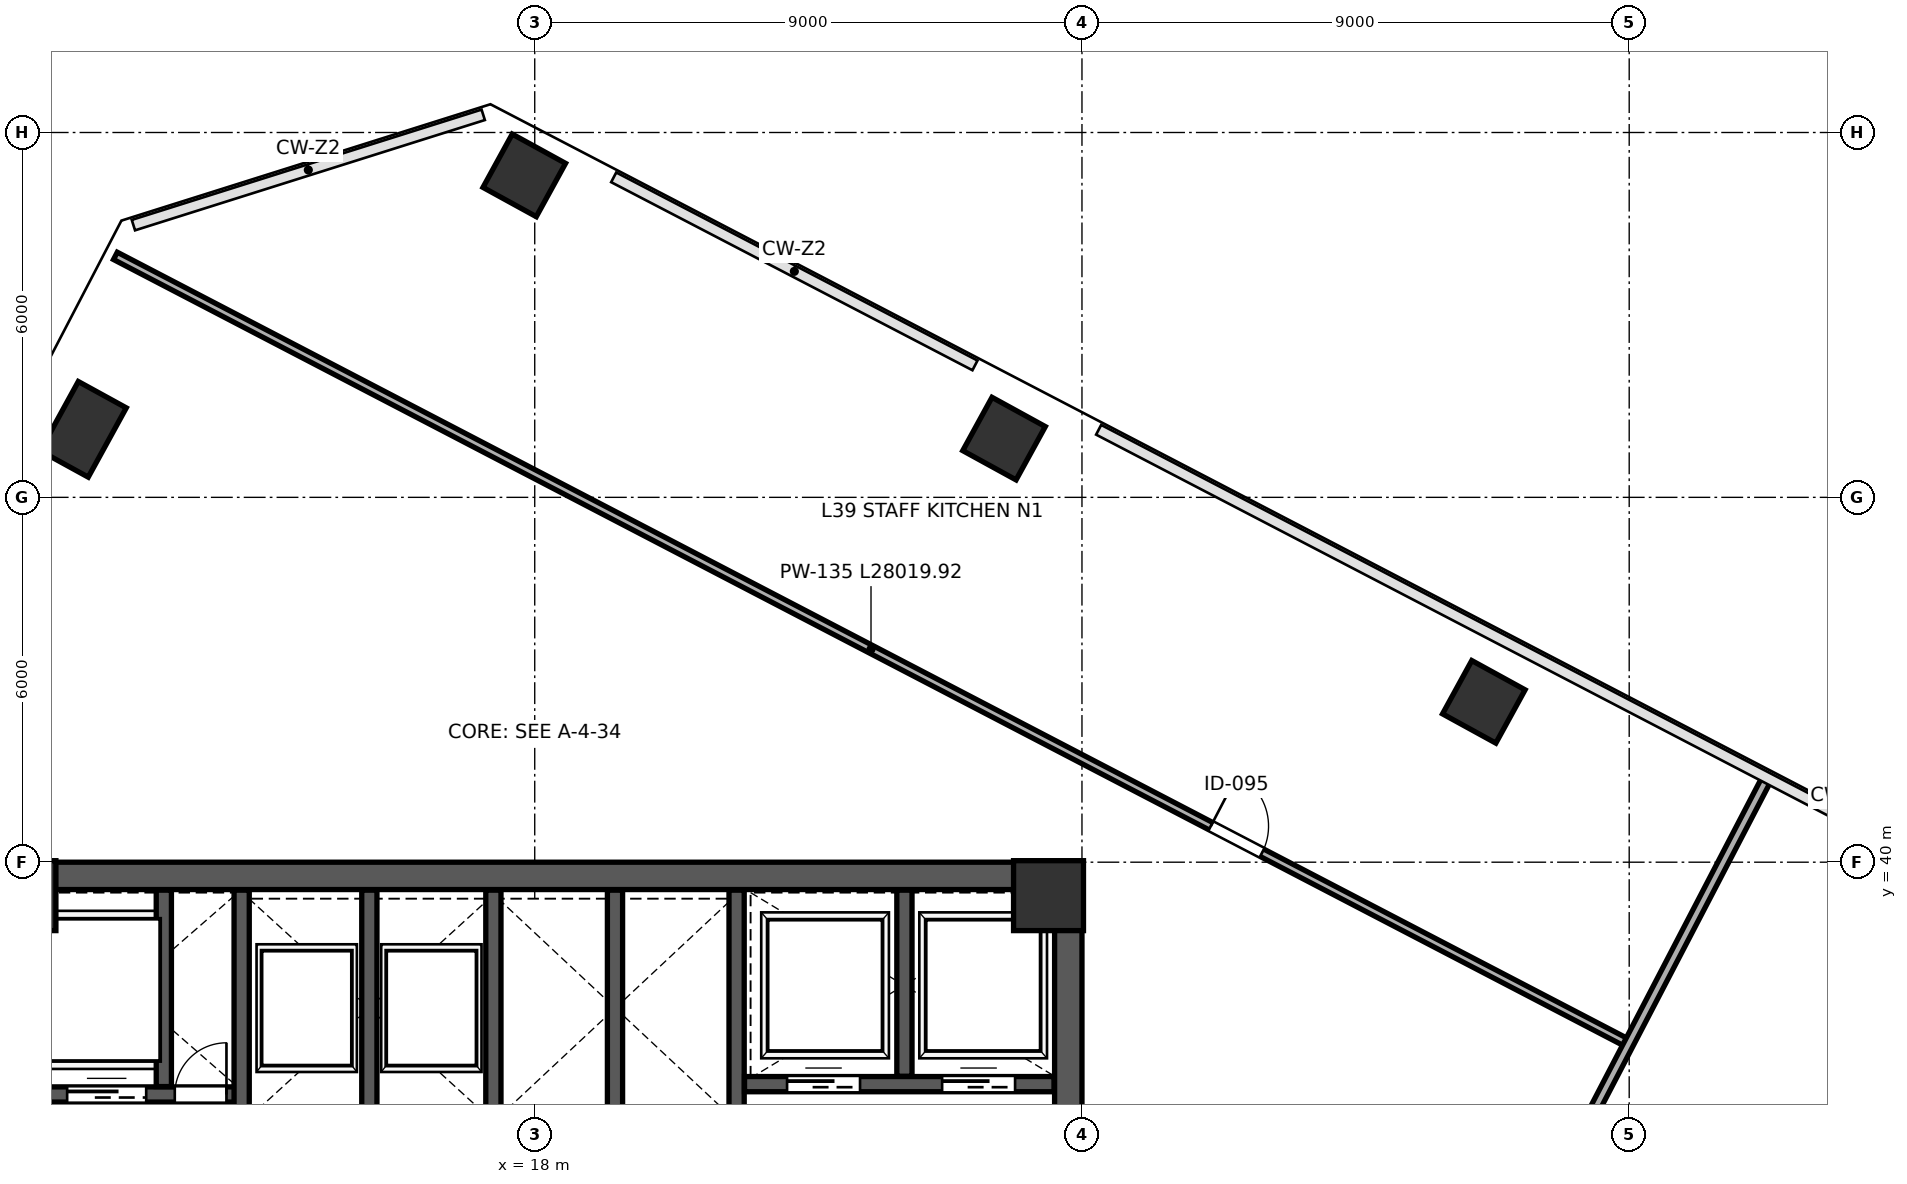
"""IFC4 building model, lengths in metres.
Left out: names, types, materials, properties, quantities, classifications, styles, units other than length and angle.
Written with IfcOpenShell. Run it as: python <this file> out.ifc"""

import sys

from ifc_helpers import new_model, si_unit, direction, frame, frame_2d, origin, origin_2d, place, context, subcontext, project, spatial, rectangle, extrude, clip, halfspace, source, transform, mapped, element, fill, save


model = new_model("IFC4")
c1 = context("Model", 3, precision=1e-05, world=origin(), true_north=direction((0.0, 1.0)))
c2 = subcontext(c1, "Body", "Model", "MODEL_VIEW")
j1 = project(units=[si_unit("LENGTHUNIT", "METRE"), si_unit("PLANEANGLEUNIT", "RADIAN")], contexts=[c1])
p1 = place(None, origin())
s1 = spatial("IfcSite", under=j1, at=p1, CompositionType="ELEMENT")
p2 = place(p1, origin())
s2 = spatial("IfcBuilding", under=s1, at=p2, CompositionType="ELEMENT")
p3 = place(p2, frame((0.0, 0.0, 175.0)))
s3 = spatial("IfcBuildingStorey", under=s2, at=p3, CompositionType="ELEMENT", Elevation=175.0)
m1 = source(origin(), c2, "Body", "SweptSolid", [
    extrude(rectangle(XDim=1.15, YDim=1.15, at=origin_2d()), origin(), (0.0, 0.0, 1.0), 4.198),
])
for number, where, z_axis, x_axis in (
    (1, (9.55, 39.45, 0.001), (0.0, 0.0, 1.0), (1.0, 0.0, 0.0)),
    (2, (26.45, 39.45, 0.001), (0.0, 0.0, 1.0), (1.0, 0.0, 0.0)),
):
    element("IfcColumn", number, at=place(p3, frame(where, z_axis=z_axis, x_axis=x_axis)), inside=s3, PredefinedType="COLUMN", context=c2, shape_type="MappedRepresentation", body=[
        mapped(m1, transform((0.0, 0.0, 0.0), scale=1.0)),
    ])
p4 = place(p3, frame((17.828, 51.295, 0.0), z_axis=(0.099928697184, 0.017869194114, 0.994834130587), x_axis=(-0.316704561364, -0.94726667041, 0.048827000127)))
e3 = element("IfcColumn", 3, at=p4, inside=s3, PredefinedType="COLUMN", context=c2, shape_type="Clipping", body=[
    clip(clip(extrude(rectangle(XDim=1.0, YDim=1.0, at=origin_2d()), origin(), (0.0, 0.0, 1.0), 4.222), halfspace(frame((0.0, 0.0, 0.07), z_axis=(0.0, 0.0, -1.0), x_axis=(1.0, 0.0, 0.0)), False)), halfspace(frame((0.0, 0.0, 4.152), z_axis=(0.0, 0.0, 1.0), x_axis=(1.0, 0.0, 0.0)), False)),
])
p5 = place(p3, frame((25.719, 46.966, 0.0), z_axis=(0.077235078987, -0.022654850625, 0.996755486725), x_axis=(-0.706813326993, -0.706339945504, 0.038714366459)))
e4 = element("IfcColumn", 4, at=p5, inside=s3, PredefinedType="COLUMN", context=c2, shape_type="Clipping", body=[
    clip(clip(extrude(rectangle(XDim=1.0, YDim=1.0, at=origin_2d()), origin(), (0.0, 0.0, 1.0), 4.214), halfspace(frame((0.0, 0.0, 0.056), z_axis=(0.0, 0.0, -1.0), x_axis=(1.0, 0.0, 0.0)), False)), halfspace(frame((0.0, 0.0, 4.158), z_axis=(0.0, 0.0, 1.0), x_axis=(1.0, 0.0, 0.0)), False)),
])
p6 = place(p3, frame((33.609, 42.637, 0.0), z_axis=(0.054393222094, -0.063256015471, 0.996513950679), x_axis=(-0.977264659428, -0.208191259518, 0.040127109214)))
e5 = element("IfcColumn", 5, at=p6, inside=s3, PredefinedType="COLUMN", context=c2, shape_type="Clipping", body=[
    clip(clip(extrude(rectangle(XDim=1.0, YDim=1.0, at=origin_2d()), origin(), (0.0, 0.0, 1.0), 4.215), halfspace(frame((0.0, 0.0, 0.058), z_axis=(0.0, 0.0, -1.0), x_axis=(1.0, 0.0, 0.0)), False)), halfspace(frame((0.0, 0.0, 4.157), z_axis=(0.0, 0.0, 1.0), x_axis=(1.0, 0.0, 0.0)), False)),
])
p7 = place(p3, frame((10.575, 47.118, 0.0), z_axis=(0.078745413321, 0.055659873339, 0.995339710039), x_axis=(0.115101966817, -0.992270247351, 0.046382038081)))
e6 = element("IfcColumn", 6, at=p7, inside=s3, PredefinedType="PILASTER", context=c2, shape_type="Clipping", body=[
    clip(clip(extrude(rectangle(XDim=0.9, YDim=1.3, at=origin_2d()), origin(), (0.0, 0.0, 1.0), 4.22), halfspace(frame((0.0, 0.0, 0.077), z_axis=(0.0, 0.0, -1.0), x_axis=(1.0, 0.0, 0.0)), False)), halfspace(frame((0.0, 0.0, 4.143), z_axis=(0.0, 0.0, 1.0), x_axis=(1.0, 0.0, 0.0)), False)),
])
p8 = place(p3, frame((26.775, 24.45, 0.0), z_axis=(0.0, 0.0, 1.0), x_axis=(0.0, 1.0, 0.0)))
e7 = element("IfcWall", 7, at=p8, inside=s3, PredefinedType="SHEAR", context=c2, shape_type="SweptSolid", body=[
    extrude(rectangle(XDim=15.1, YDim=0.45, at=frame_2d((7.55, 0.0))), origin(), (0.0, 0.0, 1.0), 3.96),
])
p9 = place(p8, frame((8.6, 0.0, 0.0)))
e8 = element("IfcOpeningElement", 8, at=p9, cuts=e7, PredefinedType="OPENING", context=c2, shape_type="SweptSolid", body=[
    extrude(rectangle(XDim=1.15, YDim=2.2, at=frame_2d((0.575, 1.1))), frame((0.0, 0.235, 0.0), z_axis=(0.0, -1.0, 0.0), x_axis=(1.0, 0.0, 0.0)), (0.0, 0.0, 1.0), 0.47),
])
p10 = place(p3, frame((9.0, 39.775, 0.0), z_axis=(0.0, 0.0, 1.0), x_axis=(1.0, 0.0, 0.0)))
e9 = element("IfcWall", 9, at=p10, inside=s3, PredefinedType="SHEAR", context=c2, shape_type="SweptSolid", body=[
    extrude(rectangle(XDim=18.0, YDim=0.45, at=frame_2d((9.0, 0.0))), origin(), (0.0, 0.0, 1.0), 3.96),
])
p11 = place(p3, frame((21.32, 32.12, 0.0), z_axis=(0.0, 0.0, 1.0), x_axis=(0.0, 1.0, 0.0)))
e10 = element("IfcWall", 10, at=p11, inside=s3, PredefinedType="SHEAR", context=c2, shape_type="SweptSolid", body=[
    extrude(rectangle(XDim=7.42, YDim=0.25, at=frame_2d((3.71, 0.0))), origin(), (0.0, 0.0, 1.0), 3.96),
])
p12 = place(p11, frame((1.4, 0.0, 0.0)))
e11 = element("IfcOpeningElement", 11, at=p12, cuts=e10, PredefinedType="OPENING", context=c2, shape_type="SweptSolid", body=[
    extrude(rectangle(XDim=1.15, YDim=2.2, at=frame_2d((0.575, 1.1))), frame((0.0, 0.135, 0.0), z_axis=(0.0, -1.0, 0.0), x_axis=(1.0, 0.0, 0.0)), (0.0, 0.0, 1.0), 0.27),
])
p13 = place(p3, frame((9.46, 36.18, 0.0), z_axis=(0.0, 0.0, 1.0), x_axis=(1.0, 0.0, 0.0)))
e12 = element("IfcWall", 12, at=p13, inside=s3, PredefinedType="SHEAR", context=c2, shape_type="SweptSolid", body=[
    extrude(rectangle(XDim=3.79, YDim=0.25, at=frame_2d((1.895, 0.0))), origin(), (0.0, 0.0, 1.0), 3.96),
])
p14 = place(p13, frame((2.62, 0.0, 0.0)))
e13 = element("IfcOpeningElement", 13, at=p14, cuts=e12, PredefinedType="OPENING", context=c2, shape_type="SweptSolid", body=[
    extrude(rectangle(XDim=0.85, YDim=2.1, at=frame_2d((0.425, 1.05))), frame((0.0, 0.135, 0.0), z_axis=(0.0, -1.0, 0.0), x_axis=(1.0, 0.0, 0.0)), (0.0, 0.0, 1.0), 0.27),
])
p15 = place(p13, frame((0.85, 0.0, 0.0)))
e14 = element("IfcOpeningElement", 14, at=p15, cuts=e12, PredefinedType="OPENING", context=c2, shape_type="SweptSolid", body=[
    extrude(rectangle(XDim=1.3, YDim=2.25, at=frame_2d((0.65, 1.125))), frame((0.0, 0.135, 0.0), z_axis=(0.0, -1.0, 0.0), x_axis=(1.0, 0.0, 0.0)), (0.0, 0.0, 1.0), 0.27),
])
p16 = place(p3, frame((11.9, 36.31, 0.0), z_axis=(0.0, 0.0, 1.0), x_axis=(0.0, 1.0, 0.0)))
e15 = element("IfcWall", 15, at=p16, inside=s3, PredefinedType="SHEAR", context=c2, shape_type="SweptSolid", body=[
    extrude(rectangle(XDim=3.23, YDim=0.25, at=frame_2d((1.615, 0.0))), origin(), (0.0, 0.0, 1.0), 3.96),
])
p17 = place(p3, frame((21.45, 36.35, 0.0), z_axis=(0.0, 0.0, 1.0), x_axis=(1.0, 0.0, 0.0)))
e16 = element("IfcWall", 16, at=p17, inside=s3, PredefinedType="SHEAR", context=c2, shape_type="SweptSolid", body=[
    extrude(rectangle(XDim=5.09, YDim=0.25, at=frame_2d((2.545, 0.0))), origin(), (0.0, 0.0, 1.0), 3.96),
])
p18 = place(p17, frame((0.7, 0.0, 0.0)))
e17 = element("IfcOpeningElement", 17, at=p18, cuts=e16, PredefinedType="OPENING", context=c2, shape_type="SweptSolid", body=[
    extrude(rectangle(XDim=1.2, YDim=2.2, at=frame_2d((0.6, 1.1))), frame((0.0, 0.135, 0.0), z_axis=(0.0, -1.0, 0.0), x_axis=(1.0, 0.0, 0.0)), (0.0, 0.0, 1.0), 0.27),
])
p19 = place(p17, frame((3.25, 0.0, 0.0)))
e18 = element("IfcOpeningElement", 18, at=p19, cuts=e16, PredefinedType="OPENING", context=c2, shape_type="SweptSolid", body=[
    extrude(rectangle(XDim=1.2, YDim=2.2, at=frame_2d((0.6, 1.1))), frame((0.0, 0.135, 0.0), z_axis=(0.0, -1.0, 0.0), x_axis=(1.0, 0.0, 0.0)), (0.0, 0.0, 1.0), 0.27),
])
p20 = place(p3, frame((24.08, 36.48, 0.0), z_axis=(0.0, 0.0, 1.0), x_axis=(0.0, 1.0, 0.0)))
e19 = element("IfcWall", 19, at=p20, inside=s3, PredefinedType="SHEAR", context=c2, shape_type="SweptSolid", body=[
    extrude(rectangle(XDim=3.06, YDim=0.25, at=frame_2d((1.53, 0.0))), origin(), (0.0, 0.0, 1.0), 3.96),
])
for number, where, z_axis, x_axis in (
    (20, (13.18, 35.81, 0.0), (0.0, 0.0, 1.0), (0.0, 1.0, 0.0)),
    (21, (15.28, 35.81, 0.0), (0.0, 0.0, 1.0), (0.0, 1.0, 0.0)),
    (22, (17.32, 35.81, 0.0), (0.0, 0.0, 1.0), (0.0, 1.0, 0.0)),
    (23, (19.32, 35.81, 0.0), (0.0, 0.0, 1.0), (0.0, 1.0, 0.0)),
):
    element("IfcWall", number, at=place(p3, frame(where, z_axis=z_axis, x_axis=x_axis)), inside=s3, PredefinedType="SHEAR", context=c2, shape_type="SweptSolid", body=[
        extrude(rectangle(XDim=3.73, YDim=0.25, at=frame_2d((1.865, 0.0))), origin(), (0.0, 0.0, 1.0), 3.96),
    ])
p21 = place(p3, frame((11.104, 49.971, 0.0), z_axis=(0.0, 0.0, 1.0), x_axis=(0.887010001249, -0.461750211353, 0.0)))
e24 = element("IfcWall", 24, at=p21, inside=s3, PredefinedType="PARTITIONING", context=c2, shape_type="SweptSolid", body=[
    extrude(rectangle(XDim=28.02, YDim=0.135, at=frame_2d((14.01, 0.0))), origin(), (0.0, 0.0, 1.0), 3.96),
])
p22 = place(p21, frame((20.31, 0.0, 0.0)))
e25 = element("IfcOpeningElement", 25, at=p22, cuts=e24, PredefinedType="OPENING", context=c2, shape_type="SweptSolid", body=[
    extrude(rectangle(XDim=0.95, YDim=2.15, at=frame_2d((0.475, 1.075))), frame((0.0, 0.078, 0.0), z_axis=(0.0, -1.0, 0.0), x_axis=(1.0, 0.0, 0.0)), (0.0, 0.0, 1.0), 0.155),
])
p23 = place(p3, frame((29.593, 24.72, 0.0), z_axis=(0.0, 0.0, 1.0), x_axis=(0.461745249096, 0.88701258443, 0.0)))
e26 = element("IfcWall", 26, at=p23, inside=s3, PredefinedType="PARTITIONING", context=c2, shape_type="SweptSolid", body=[
    extrude(rectangle(XDim=18.74, YDim=0.16, at=frame_2d((9.37, 0.0))), origin(), (0.0, 0.0, 1.0), 3.195),
])
m2 = source(origin(), c2, "Body", "SweptSolid", [
    extrude(rectangle(XDim=0.85, YDim=2.1, at=frame_2d((0.425, 1.05))), frame((0.0, 0.025, 0.0), z_axis=(0.0, -1.0, 0.0), x_axis=(1.0, 0.0, 0.0)), (0.0, 0.0, 1.0), 0.05),
])
p24 = place(p14, origin())
e27 = element("IfcDoor", 27, at=p24, inside=s3, OperationType="SINGLE_SWING_RIGHT", PredefinedType="DOOR", context=c2, shape_type="MappedRepresentation", body=[
    mapped(m2, transform((0.0, 0.0, 0.0), scale=1.0)),
])
fill(e13, e27)
m3 = source(origin(), c2, "Body", "SweptSolid", [
    extrude(rectangle(XDim=1.2, YDim=2.2, at=frame_2d((0.6, 1.1))), frame((0.0, 0.025, 0.0), z_axis=(0.0, -1.0, 0.0), x_axis=(1.0, 0.0, 0.0)), (0.0, 0.0, 1.0), 0.05),
])
p25 = place(p18, origin())
e28 = element("IfcDoor", 28, at=p25, inside=s3, OperationType="SLIDING_TO_LEFT", PredefinedType="DOOR", context=c2, shape_type="MappedRepresentation", body=[
    mapped(m3, transform((0.0, 0.0, 0.0), scale=1.0)),
])
fill(e17, e28)
p26 = place(p19, origin())
e29 = element("IfcDoor", 29, at=p26, inside=s3, OperationType="SLIDING_TO_RIGHT", PredefinedType="DOOR", context=c2, shape_type="MappedRepresentation", body=[
    mapped(m3, transform((0.0, 0.0, 0.0), scale=1.0)),
])
fill(e18, e29)
m4 = source(origin(), c2, "Body", "SweptSolid", [
    extrude(rectangle(XDim=1.3, YDim=2.25, at=frame_2d((0.65, 1.125))), frame((0.0, 0.025, 0.0), z_axis=(0.0, -1.0, 0.0), x_axis=(1.0, 0.0, 0.0)), (0.0, 0.0, 1.0), 0.05),
])
p27 = place(p15, origin())
e30 = element("IfcDoor", 30, at=p27, inside=s3, OperationType="SLIDING_TO_LEFT", PredefinedType="DOOR", context=c2, shape_type="MappedRepresentation", body=[
    mapped(m4, transform((0.0, 0.0, 0.0), scale=1.0)),
])
fill(e14, e30)
m5 = source(origin(), c2, "Body", "SweptSolid", [
    extrude(rectangle(XDim=0.95, YDim=2.15, at=frame_2d((0.475, 1.075))), frame((0.0, 0.025, 0.0), z_axis=(0.0, -1.0, 0.0), x_axis=(1.0, 0.0, 0.0)), (0.0, 0.0, 1.0), 0.05),
])
p28 = place(p22, origin())
e31 = element("IfcDoor", 31, at=p28, inside=s3, OperationType="SINGLE_SWING_LEFT", PredefinedType="DOOR", context=c2, shape_type="MappedRepresentation", body=[
    mapped(m5, transform((0.0, 0.0, 0.0), scale=1.0)),
])
fill(e25, e31)
save(model, sys.argv[1])
